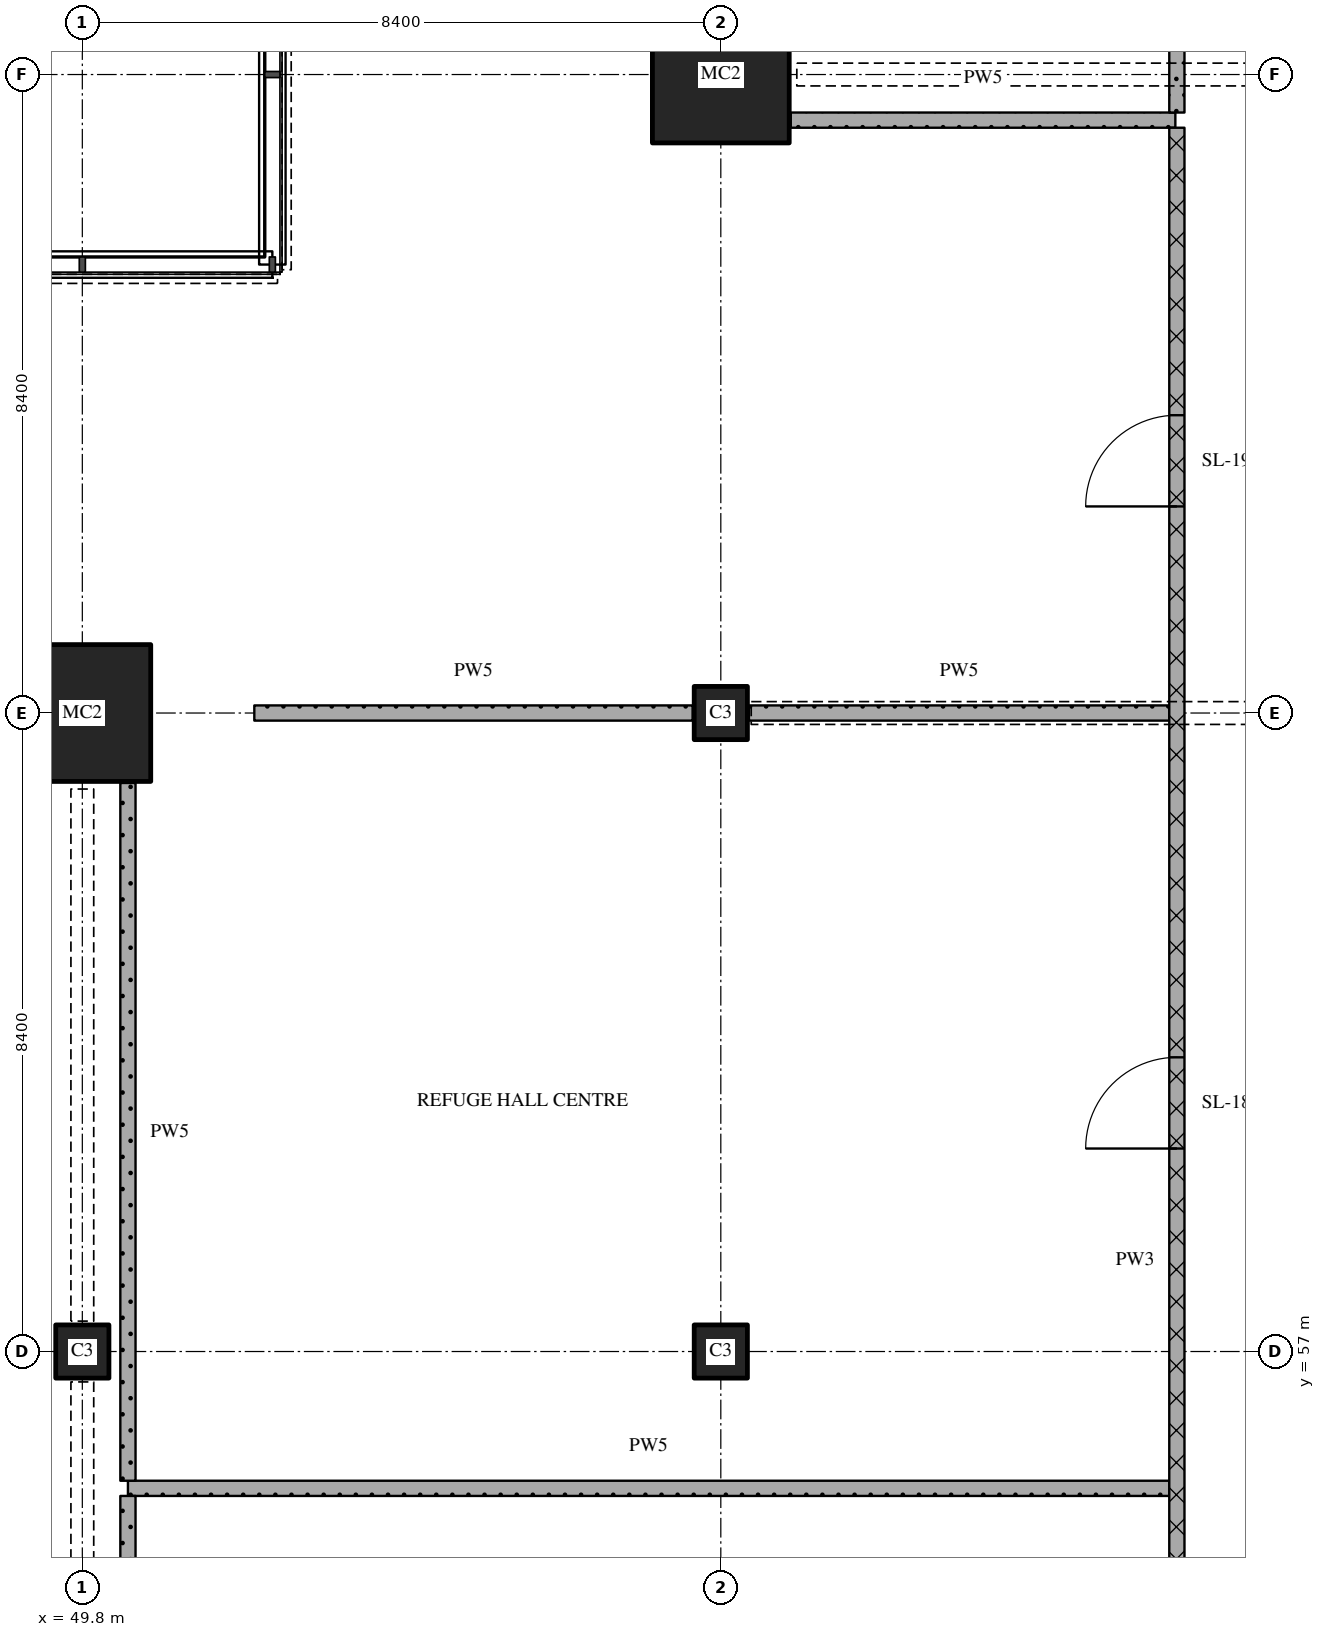
"""IFC4 building model, lengths in metres.
Left out: names, types, materials, properties, quantities, classifications, styles, units other than length and angle.
Written with IfcOpenShell. Run it as: python <this file> out.ifc"""

import sys

from ifc_helpers import new_model, si_unit, direction, frame, frame_2d, origin, origin_2d, place, context, subcontext, project, spatial, rectangle, extrude, element, fill, save


model = new_model("IFC4")
c1 = context("Model", 3, precision=1e-05, world=origin(), true_north=direction((0.0, 1.0)))
c2 = subcontext(c1, "Body", "Model", "MODEL_VIEW")
j1 = project(units=[si_unit("LENGTHUNIT", "METRE"), si_unit("PLANEANGLEUNIT", "RADIAN")], contexts=[c1])
p1 = place(None, origin())
s1 = spatial("IfcSite", under=j1, at=p1, CompositionType="ELEMENT")
p2 = place(p1, origin())
s2 = spatial("IfcBuilding", under=s1, at=p2, CompositionType="ELEMENT")
p3 = place(p2, frame((0.0, 0.0, 142.05)))
s3 = spatial("IfcBuildingStorey", under=s2, at=p3, CompositionType="ELEMENT", Elevation=142.05)
p4 = place(p3, frame((49.8, 57.0, 0.0), z_axis=(0.0, 0.0, 1.0), x_axis=(1.0, 0.0, 0.0)))
e1 = element("IfcColumn", 1, at=p4, inside=s3, PredefinedType="COLUMN", context=c2, shape_type="SweptSolid", body=[
    extrude(rectangle(XDim=0.7, YDim=0.7, at=origin_2d()), origin(), (0.0, 0.0, 1.0), 5.4),
])
p5 = place(p3, frame((49.8, 65.4, 0.0), z_axis=(0.0, 0.0, 1.0), x_axis=(1.0, 0.0, 0.0)))
e2 = element("IfcColumn", 2, at=p5, inside=s3, PredefinedType="COLUMN", context=c2, shape_type="SweptSolid", body=[
    extrude(rectangle(XDim=1.8, YDim=1.8, at=origin_2d()), origin(), (0.0, 0.0, 1.0), 5.4),
])
for number, where, z_axis, x_axis in (
    (3, (58.2, 57.0, 0.0), (0.0, 0.0, 1.0), (1.0, 0.0, 0.0)),
    (4, (58.2, 65.4, 0.0), (0.0, 0.0, 1.0), (1.0, 0.0, 0.0)),
):
    element("IfcColumn", number, at=place(p3, frame(where, z_axis=z_axis, x_axis=x_axis)), inside=s3, PredefinedType="COLUMN", context=c2, shape_type="SweptSolid", body=[
        extrude(rectangle(XDim=0.7, YDim=0.7, at=origin_2d()), origin(), (0.0, 0.0, 1.0), 5.4),
    ])
p6 = place(p3, frame((58.2, 73.8, 0.0), z_axis=(0.0, 0.0, 1.0), x_axis=(1.0, 0.0, 0.0)))
e5 = element("IfcColumn", 5, at=p6, inside=s3, PredefinedType="COLUMN", context=c2, shape_type="SweptSolid", body=[
    extrude(rectangle(XDim=1.8, YDim=1.8, at=origin_2d()), origin(), (0.0, 0.0, 1.0), 5.4),
])
p7 = place(p3, frame((50.4, 55.2, 0.0), z_axis=(0.0, 0.0, 1.0), x_axis=(1.0, 0.0, 0.0)))
e6 = element("IfcWall", 6, at=p7, inside=s3, PredefinedType="PARTITIONING", context=c2, shape_type="SweptSolid", body=[
    extrude(rectangle(XDim=13.7, YDim=0.2, at=frame_2d((6.85, 0.0))), origin(), (0.0, 0.0, 1.0), 5.12),
])
p8 = place(p3, frame((52.063, 65.4, 0.0), z_axis=(0.0, 0.0, 1.0), x_axis=(1.0, 0.0, 0.0)))
e7 = element("IfcWall", 7, at=p8, inside=s3, PredefinedType="PARTITIONING", context=c2, shape_type="SweptSolid", body=[
    extrude(rectangle(XDim=5.767, YDim=0.2, at=frame_2d((2.884, 0.0))), origin(), (0.0, 0.0, 1.0), 5.12),
])
p9 = place(p3, frame((58.57, 65.4, 0.0), z_axis=(0.0, 0.0, 1.0), x_axis=(1.0, 0.0, 0.0)))
e8 = element("IfcWall", 8, at=p9, inside=s3, PredefinedType="PARTITIONING", context=c2, shape_type="SweptSolid", body=[
    extrude(rectangle(XDim=5.53, YDim=0.2, at=frame_2d((2.765, 0.0))), origin(), (0.0, 0.0, 1.0), 4.67),
])
p10 = place(p3, frame((59.12, 73.2, 0.0), z_axis=(0.0, 0.0, 1.0), x_axis=(1.0, 0.0, 0.0)))
e9 = element("IfcWall", 9, at=p10, inside=s3, PredefinedType="PARTITIONING", context=c2, shape_type="SweptSolid", body=[
    extrude(rectangle(XDim=5.06, YDim=0.2, at=frame_2d((2.53, 0.0))), origin(), (0.0, 0.0, 1.0), 5.12),
])
p11 = place(p3, frame((50.4, 55.1, 0.0), z_axis=(0.0, 0.0, 1.0), x_axis=(0.0, -1.0, 0.0)))
e10 = element("IfcWall", 10, at=p11, inside=s3, PredefinedType="PARTITIONING", context=c2, shape_type="SweptSolid", body=[
    extrude(rectangle(XDim=11.8, YDim=0.2, at=frame_2d((5.9, 0.0))), origin(), (0.0, 0.0, 1.0), 5.12),
])
p12 = place(p3, frame((50.4, 64.48, 0.0), z_axis=(0.0, 0.0, 1.0), x_axis=(0.0, -1.0, 0.0)))
e11 = element("IfcWall", 11, at=p12, inside=s3, PredefinedType="PARTITIONING", context=c2, shape_type="SweptSolid", body=[
    extrude(rectangle(XDim=9.18, YDim=0.2, at=frame_2d((4.59, 0.0))), origin(), (0.0, 0.0, 1.0), 5.12),
])
p13 = place(p3, frame((64.2, 43.3, 0.0), z_axis=(0.0, 0.0, 1.0), x_axis=(0.0, 1.0, 0.0)))
e12 = element("IfcWall", 12, at=p13, inside=s3, PredefinedType="PARTITIONING", context=c2, shape_type="SweptSolid", body=[
    extrude(rectangle(XDim=29.8, YDim=0.2, at=frame_2d((14.9, 0.0))), origin(), (0.0, 0.0, 1.0), 5.12),
])
p14 = place(p13, frame((16.371, 0.0, 0.0)))
e13 = element("IfcOpeningElement", 13, at=p14, cuts=e12, PredefinedType="OPENING", context=c2, shape_type="SweptSolid", body=[
    extrude(rectangle(XDim=1.2, YDim=2.1, at=frame_2d((0.6, 1.05))), frame((0.0, 0.11, 0.0), z_axis=(0.0, -1.0, 0.0), x_axis=(1.0, 0.0, 0.0)), (0.0, 0.0, 1.0), 0.22),
])
p15 = place(p13, frame((24.818, 0.0, 0.0)))
e14 = element("IfcOpeningElement", 14, at=p15, cuts=e12, PredefinedType="OPENING", context=c2, shape_type="SweptSolid", body=[
    extrude(rectangle(XDim=1.2, YDim=2.1, at=frame_2d((0.6, 1.05))), frame((0.0, 0.11, 0.0), z_axis=(0.0, -1.0, 0.0), x_axis=(1.0, 0.0, 0.0)), (0.0, 0.0, 1.0), 0.22),
])
p16 = place(p3, frame((64.2, 75.3, 0.0), z_axis=(0.0, 0.0, 1.0), x_axis=(0.0, -1.0, 0.0)))
e15 = element("IfcWall", 15, at=p16, inside=s3, PredefinedType="PARTITIONING", context=c2, shape_type="SweptSolid", body=[
    extrude(rectangle(XDim=2.0, YDim=0.2, at=frame_2d((1.0, 0.0))), origin(), (0.0, 0.0, 1.0), 5.12),
])
p17 = place(p14, origin())
e16 = element("IfcDoor", 16, at=p17, inside=s3, OperationType="SINGLE_SWING_LEFT", PredefinedType="DOOR", context=c2, shape_type="SweptSolid", body=[
    extrude(rectangle(XDim=1.2, YDim=2.1, at=frame_2d((0.6, 1.05))), frame((0.0, 0.025, 0.0), z_axis=(0.0, -1.0, 0.0), x_axis=(1.0, 0.0, 0.0)), (0.0, 0.0, 1.0), 0.05),
])
fill(e13, e16)
p18 = place(p15, origin())
e17 = element("IfcDoor", 17, at=p18, inside=s3, OperationType="SINGLE_SWING_LEFT", PredefinedType="DOOR", context=c2, shape_type="SweptSolid", body=[
    extrude(rectangle(XDim=1.2, YDim=2.1, at=frame_2d((0.6, 1.05))), frame((0.0, 0.025, 0.0), z_axis=(0.0, -1.0, 0.0), x_axis=(1.0, 0.0, 0.0)), (0.0, 0.0, 1.0), 0.05),
])
fill(e14, e17)
save(model, sys.argv[1])
